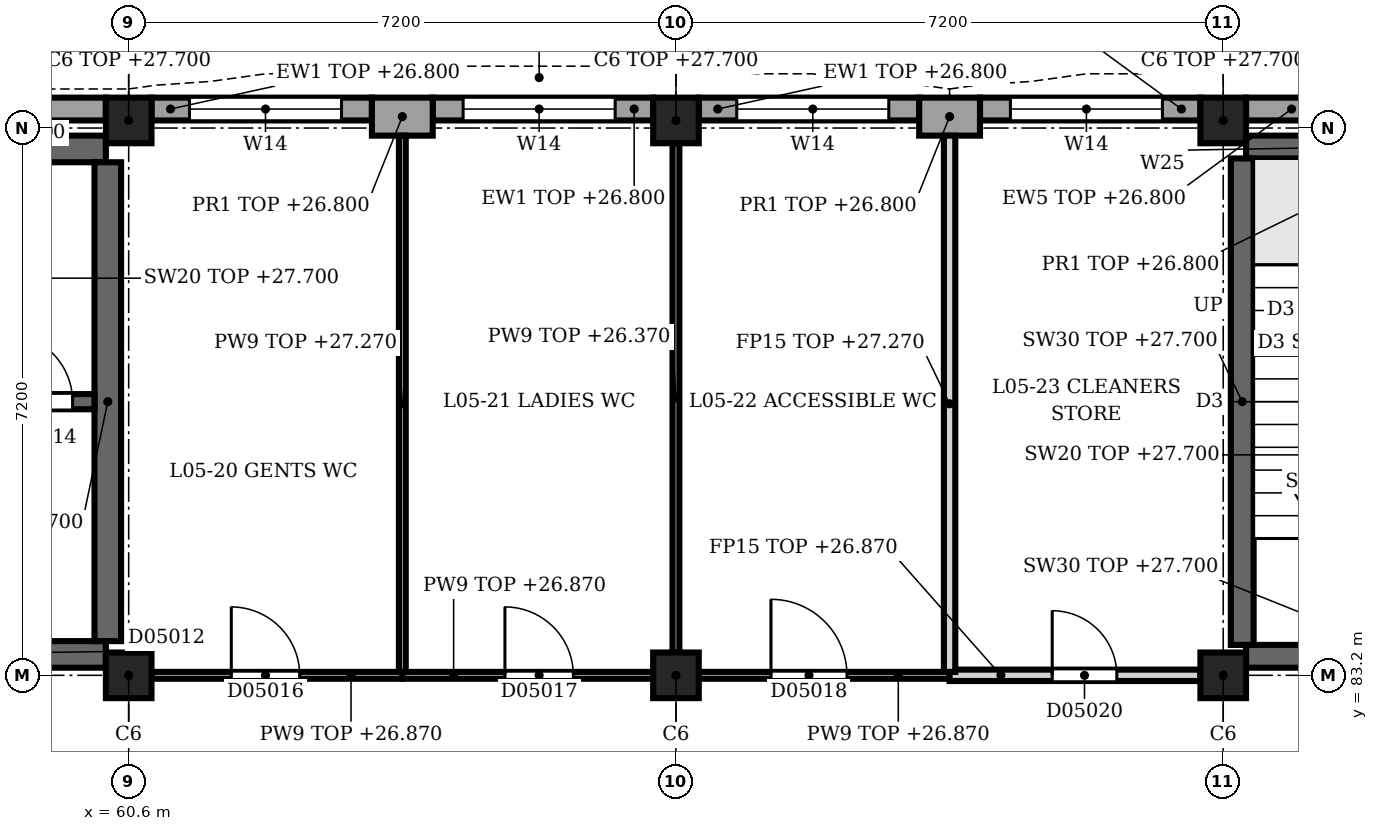
"""IFC4 building model, lengths in metres.
Left out: names, types, materials, properties, quantities, classifications, styles, units other than length and angle.
Written with IfcOpenShell. Run it as: python <this file> out.ifc"""

import sys

from ifc_helpers import new_model, si_unit, direction, frame, frame_2d, origin, origin_2d, place, context, subcontext, project, spatial, rectangle, extrude, element, fill, save


model = new_model("IFC4")
c1 = context("Model", 3, precision=1e-05, world=origin(), true_north=direction((0.0, 1.0)))
c2 = subcontext(c1, "Body", "Model", "MODEL_VIEW")
j1 = project(units=[si_unit("LENGTHUNIT", "METRE"), si_unit("PLANEANGLEUNIT", "RADIAN")], contexts=[c1])
p1 = place(None, origin())
s1 = spatial("IfcSite", under=j1, at=p1, CompositionType="ELEMENT")
p2 = place(p1, origin())
s2 = spatial("IfcBuilding", under=s1, at=p2, CompositionType="ELEMENT")
p3 = place(p2, frame((0.0, 0.0, 23.4)))
s3 = spatial("IfcBuildingStorey", under=s2, at=p3, CompositionType="ELEMENT", Elevation=23.4)
p4 = place(p3, frame((60.6, 83.2, 0.0), z_axis=(0.0, 0.0, 1.0), x_axis=(1.0, 0.0, 0.0)))
e1 = element("IfcColumn", 1, at=p4, inside=s3, PredefinedType="COLUMN", context=c2, shape_type="SweptSolid", body=[
    extrude(rectangle(XDim=0.6, YDim=0.6, at=origin_2d()), origin(), (0.0, 0.0, 1.0), 4.5),
])
p5 = place(p3, frame((60.6, 90.5, 0.0), z_axis=(0.0, 0.0, 1.0), x_axis=(1.0, 0.0, 0.0)))
e2 = element("IfcColumn", 2, at=p5, inside=s3, PredefinedType="COLUMN", context=c2, shape_type="SweptSolid", body=[
    extrude(rectangle(XDim=0.6, YDim=0.6, at=origin_2d()), origin(), (0.0, 0.0, 1.0), 4.3),
])
p6 = place(p3, frame((67.8, 83.2, 0.0), z_axis=(0.0, 0.0, 1.0), x_axis=(1.0, 0.0, 0.0)))
e3 = element("IfcColumn", 3, at=p6, inside=s3, PredefinedType="COLUMN", context=c2, shape_type="SweptSolid", body=[
    extrude(rectangle(XDim=0.6, YDim=0.6, at=origin_2d()), origin(), (0.0, 0.0, 1.0), 4.5),
])
p7 = place(p3, frame((67.8, 90.5, 0.0), z_axis=(0.0, 0.0, 1.0), x_axis=(1.0, 0.0, 0.0)))
e4 = element("IfcColumn", 4, at=p7, inside=s3, PredefinedType="COLUMN", context=c2, shape_type="SweptSolid", body=[
    extrude(rectangle(XDim=0.6, YDim=0.6, at=origin_2d()), origin(), (0.0, 0.0, 1.0), 4.3),
])
p8 = place(p3, frame((75.0, 83.2, 0.0), z_axis=(0.0, 0.0, 1.0), x_axis=(1.0, 0.0, 0.0)))
e5 = element("IfcColumn", 5, at=p8, inside=s3, PredefinedType="COLUMN", context=c2, shape_type="SweptSolid", body=[
    extrude(rectangle(XDim=0.6, YDim=0.6, at=origin_2d()), origin(), (0.0, 0.0, 1.0), 4.5),
])
p9 = place(p3, frame((75.0, 90.5, 0.0), z_axis=(0.0, 0.0, 1.0), x_axis=(1.0, 0.0, 0.0)))
e6 = element("IfcColumn", 6, at=p9, inside=s3, PredefinedType="COLUMN", context=c2, shape_type="SweptSolid", body=[
    extrude(rectangle(XDim=0.6, YDim=0.6, at=origin_2d()), origin(), (0.0, 0.0, 1.0), 4.3),
])
for number, where, z_axis, x_axis in (
    (7, (63.8, 90.55, 0.0), (0.0, 0.0, 1.0), (1.0, 0.0, 0.0)),
    (8, (71.0, 90.55, 0.0), (0.0, 0.0, 1.0), (1.0, 0.0, 0.0)),
):
    element("IfcWall", number, at=place(p3, frame(where, z_axis=z_axis, x_axis=x_axis)), inside=s3, PredefinedType="SOLIDWALL", context=c2, shape_type="SweptSolid", body=[
        extrude(rectangle(XDim=0.8, YDim=0.5, at=frame_2d((0.4, 0.0))), origin(), (0.0, 0.0, 1.0), 3.4),
    ])
p10 = place(p3, frame((57.4, 90.65, 0.0), z_axis=(0.0, 0.0, 1.0), x_axis=(1.0, 0.0, 0.0)))
e9 = element("IfcWall", 9, at=p10, inside=s3, PredefinedType="SOLIDWALL", context=c2, shape_type="SweptSolid", body=[
    extrude(rectangle(XDim=2.9, YDim=0.3, at=frame_2d((1.45, 0.0))), origin(), (0.0, 0.0, 1.0), 3.4),
])
p11 = place(p3, frame((60.9, 90.65, 0.0), z_axis=(0.0, 0.0, 1.0), x_axis=(1.0, 0.0, 0.0)))
e10 = element("IfcWall", 10, at=p11, inside=s3, PredefinedType="SOLIDWALL", context=c2, shape_type="SweptSolid", body=[
    extrude(rectangle(XDim=2.9, YDim=0.3, at=frame_2d((1.45, 0.0))), origin(), (0.0, 0.0, 1.0), 3.4),
])
p12 = place(p11, frame((0.5, 0.0, 0.9)))
e11 = element("IfcOpeningElement", 11, at=p12, cuts=e10, PredefinedType="OPENING", context=c2, shape_type="SweptSolid", body=[
    extrude(rectangle(XDim=2.0, YDim=2.4, at=frame_2d((1.0, 1.2))), frame((0.0, 0.16, 0.0), z_axis=(0.0, -1.0, 0.0), x_axis=(1.0, 0.0, 0.0)), (0.0, 0.0, 1.0), 0.32),
])
p13 = place(p3, frame((64.6, 90.65, 0.0), z_axis=(0.0, 0.0, 1.0), x_axis=(1.0, 0.0, 0.0)))
e12 = element("IfcWall", 12, at=p13, inside=s3, PredefinedType="SOLIDWALL", context=c2, shape_type="SweptSolid", body=[
    extrude(rectangle(XDim=2.9, YDim=0.3, at=frame_2d((1.45, 0.0))), origin(), (0.0, 0.0, 1.0), 3.4),
])
p14 = place(p13, frame((0.4, 0.0, 0.9)))
e13 = element("IfcOpeningElement", 13, at=p14, cuts=e12, PredefinedType="OPENING", context=c2, shape_type="SweptSolid", body=[
    extrude(rectangle(XDim=2.0, YDim=2.4, at=frame_2d((1.0, 1.2))), frame((0.0, 0.16, 0.0), z_axis=(0.0, -1.0, 0.0), x_axis=(1.0, 0.0, 0.0)), (0.0, 0.0, 1.0), 0.32),
])
p15 = place(p3, frame((68.1, 90.65, 0.0), z_axis=(0.0, 0.0, 1.0), x_axis=(1.0, 0.0, 0.0)))
e14 = element("IfcWall", 14, at=p15, inside=s3, PredefinedType="SOLIDWALL", context=c2, shape_type="SweptSolid", body=[
    extrude(rectangle(XDim=2.9, YDim=0.3, at=frame_2d((1.45, 0.0))), origin(), (0.0, 0.0, 1.0), 3.4),
])
p16 = place(p15, frame((0.5, 0.0, 0.9)))
e15 = element("IfcOpeningElement", 15, at=p16, cuts=e14, PredefinedType="OPENING", context=c2, shape_type="SweptSolid", body=[
    extrude(rectangle(XDim=2.0, YDim=2.4, at=frame_2d((1.0, 1.2))), frame((0.0, 0.16, 0.0), z_axis=(0.0, -1.0, 0.0), x_axis=(1.0, 0.0, 0.0)), (0.0, 0.0, 1.0), 0.32),
])
p17 = place(p3, frame((71.8, 90.65, 0.0), z_axis=(0.0, 0.0, 1.0), x_axis=(1.0, 0.0, 0.0)))
e16 = element("IfcWall", 16, at=p17, inside=s3, PredefinedType="SOLIDWALL", context=c2, shape_type="SweptSolid", body=[
    extrude(rectangle(XDim=2.9, YDim=0.3, at=frame_2d((1.45, 0.0))), origin(), (0.0, 0.0, 1.0), 3.4),
])
p18 = place(p17, frame((0.4, 0.0, 0.9)))
e17 = element("IfcOpeningElement", 17, at=p18, cuts=e16, PredefinedType="OPENING", context=c2, shape_type="SweptSolid", body=[
    extrude(rectangle(XDim=2.0, YDim=2.4, at=frame_2d((1.0, 1.2))), frame((0.0, 0.16, 0.0), z_axis=(0.0, -1.0, 0.0), x_axis=(1.0, 0.0, 0.0)), (0.0, 0.0, 1.0), 0.32),
])
p19 = place(p3, frame((75.3, 90.65, 0.0), z_axis=(0.0, 0.0, 1.0), x_axis=(1.0, 0.0, 0.0)))
e18 = element("IfcWall", 18, at=p19, inside=s3, PredefinedType="SOLIDWALL", context=c2, shape_type="SweptSolid", body=[
    extrude(rectangle(XDim=2.9, YDim=0.3, at=frame_2d((1.45, 0.0))), origin(), (0.0, 0.0, 1.0), 3.4),
])
p20 = place(p19, frame((1.2, 0.0, 1.2)))
e19 = element("IfcOpeningElement", 19, at=p20, cuts=e18, PredefinedType="OPENING", context=c2, shape_type="SweptSolid", body=[
    extrude(rectangle(XDim=0.6, YDim=1.8, at=frame_2d((0.3, 0.9))), frame((0.0, 0.16, 0.0), z_axis=(0.0, -1.0, 0.0), x_axis=(1.0, 0.0, 0.0)), (0.0, 0.0, 1.0), 0.32),
])
p21 = place(p3, frame((53.7, 83.475, 0.0), z_axis=(0.0, 0.0, 1.0), x_axis=(1.0, 0.0, 0.0)))
e20 = element("IfcWall", 20, at=p21, inside=s3, PredefinedType="SHEAR", context=c2, shape_type="SweptSolid", body=[
    extrude(rectangle(XDim=6.6, YDim=0.35, at=frame_2d((3.3, 0.0))), origin(), (0.0, 0.0, 1.0), 4.3),
])
p22 = place(p21, frame((2.7, 0.0, 0.0)))
e21 = element("IfcOpeningElement", 21, at=p22, cuts=e20, PredefinedType="OPENING", context=c2, shape_type="SweptSolid", body=[
    extrude(rectangle(XDim=1.8, YDim=2.1, at=frame_2d((0.9, 1.05))), frame((0.0, 0.185, 0.0), z_axis=(0.0, -1.0, 0.0), x_axis=(1.0, 0.0, 0.0)), (0.0, 0.0, 1.0), 0.37),
])
p23 = place(p3, frame((53.7, 90.125, 0.0), z_axis=(0.0, 0.0, 1.0), x_axis=(1.0, 0.0, 0.0)))
e22 = element("IfcWall", 22, at=p23, inside=s3, PredefinedType="SHEAR", context=c2, shape_type="SweptSolid", body=[
    extrude(rectangle(XDim=6.6, YDim=0.35, at=frame_2d((3.3, 0.0))), origin(), (0.0, 0.0, 1.0), 4.3),
])
p24 = place(p3, frame((60.325, 83.65, 0.0), z_axis=(0.0, 0.0, 1.0), x_axis=(0.0, 1.0, 0.0)))
e23 = element("IfcWall", 23, at=p24, inside=s3, PredefinedType="SHEAR", context=c2, shape_type="SweptSolid", body=[
    extrude(rectangle(XDim=6.3, YDim=0.35, at=frame_2d((3.15, 0.0))), origin(), (0.0, 0.0, 1.0), 4.3),
])
p25 = place(p3, frame((60.15, 86.8, 0.0), z_axis=(0.0, 0.0, 1.0), x_axis=(-1.0, 0.0, 0.0)))
e24 = element("IfcWall", 24, at=p25, inside=s3, PredefinedType="SHEAR", context=c2, shape_type="SweptSolid", body=[
    extrude(rectangle(XDim=10.35, YDim=0.2, at=frame_2d((5.175, 0.0))), origin(), (0.0, 0.0, 1.0), 4.3),
])
p26 = place(p25, frame((8.8, 0.0, 0.0)))
e25 = element("IfcOpeningElement", 25, at=p26, cuts=e24, PredefinedType="OPENING", context=c2, shape_type="SweptSolid", body=[
    extrude(rectangle(XDim=1.1, YDim=2.1, at=frame_2d((0.55, 1.05))), frame((0.0, 0.11, 0.0), z_axis=(0.0, -1.0, 0.0), x_axis=(1.0, 0.0, 0.0)), (0.0, 0.0, 1.0), 0.22),
])
p27 = place(p25, frame((6.6, 0.0, 0.0)))
e26 = element("IfcOpeningElement", 26, at=p27, cuts=e24, PredefinedType="OPENING", context=c2, shape_type="SweptSolid", body=[
    extrude(rectangle(XDim=1.1, YDim=2.1, at=frame_2d((0.55, 1.05))), frame((0.0, 0.11, 0.0), z_axis=(0.0, -1.0, 0.0), x_axis=(1.0, 0.0, 0.0)), (0.0, 0.0, 1.0), 0.22),
])
p28 = place(p25, frame((3.75, 0.0, 0.0)))
e27 = element("IfcOpeningElement", 27, at=p28, cuts=e24, PredefinedType="OPENING", context=c2, shape_type="SweptSolid", body=[
    extrude(rectangle(XDim=1.4, YDim=2.1, at=frame_2d((0.7, 1.05))), frame((0.0, 0.11, 0.0), z_axis=(0.0, -1.0, 0.0), x_axis=(1.0, 0.0, 0.0)), (0.0, 0.0, 1.0), 0.22),
])
p29 = place(p25, frame((1.962, 0.0, 0.0)))
e28 = element("IfcOpeningElement", 28, at=p29, cuts=e24, PredefinedType="OPENING", context=c2, shape_type="SweptSolid", body=[
    extrude(rectangle(XDim=0.9, YDim=2.1, at=frame_2d((0.45, 1.05))), frame((0.0, 0.11, 0.0), z_axis=(0.0, -1.0, 0.0), x_axis=(1.0, 0.0, 0.0)), (0.0, 0.0, 1.0), 0.22),
])
p30 = place(p25, frame((0.288, 0.0, 0.0)))
e29 = element("IfcOpeningElement", 29, at=p30, cuts=e24, PredefinedType="OPENING", context=c2, shape_type="SweptSolid", body=[
    extrude(rectangle(XDim=0.9, YDim=2.1, at=frame_2d((0.45, 1.05))), frame((0.0, 0.11, 0.0), z_axis=(0.0, -1.0, 0.0), x_axis=(1.0, 0.0, 0.0)), (0.0, 0.0, 1.0), 0.22),
])
p31 = place(p3, frame((75.3, 83.45, 0.0), z_axis=(0.0, 0.0, 1.0), x_axis=(1.0, 0.0, 0.0)))
e30 = element("IfcWall", 30, at=p31, inside=s3, PredefinedType="SHEAR", context=c2, shape_type="SweptSolid", body=[
    extrude(rectangle(XDim=6.7, YDim=0.3, at=frame_2d((3.35, 0.0))), origin(), (0.0, 0.0, 1.0), 4.3),
])
p32 = place(p31, frame((4.3, 0.0, 0.0)))
e31 = element("IfcOpeningElement", 31, at=p32, cuts=e30, PredefinedType="OPENING", context=c2, shape_type="SweptSolid", body=[
    extrude(rectangle(XDim=1.2, YDim=2.1, at=frame_2d((0.6, 1.05))), frame((0.0, 0.16, 0.0), z_axis=(0.0, -1.0, 0.0), x_axis=(1.0, 0.0, 0.0)), (0.0, 0.0, 1.0), 0.32),
])
p33 = place(p3, frame((75.3, 90.15, 0.0), z_axis=(0.0, 0.0, 1.0), x_axis=(1.0, 0.0, 0.0)))
e32 = element("IfcWall", 32, at=p33, inside=s3, PredefinedType="SHEAR", context=c2, shape_type="SweptSolid", body=[
    extrude(rectangle(XDim=6.7, YDim=0.3, at=frame_2d((3.35, 0.0))), origin(), (0.0, 0.0, 1.0), 4.3),
])
p34 = place(p33, frame((1.2, 0.0, 1.2)))
e33 = element("IfcOpeningElement", 33, at=p34, cuts=e32, PredefinedType="OPENING", context=c2, shape_type="SweptSolid", body=[
    extrude(rectangle(XDim=0.6, YDim=1.8, at=frame_2d((0.3, 0.9))), frame((0.0, 0.16, 0.0), z_axis=(0.0, -1.0, 0.0), x_axis=(1.0, 0.0, 0.0)), (0.0, 0.0, 1.0), 0.32),
])
p35 = place(p3, frame((75.25, 83.6, 0.0), z_axis=(0.0, 0.0, 1.0), x_axis=(0.0, 1.0, 0.0)))
e34 = element("IfcWall", 34, at=p35, inside=s3, PredefinedType="SHEAR", context=c2, shape_type="SweptSolid", body=[
    extrude(rectangle(XDim=6.4, YDim=0.3, at=frame_2d((3.2, 0.0))), origin(), (0.0, 0.0, 1.0), 4.3),
])
p36 = place(p3, frame((60.9, 83.2, 0.0), z_axis=(0.0, 0.0, 1.0), x_axis=(1.0, 0.0, 0.0)))
e35 = element("IfcWall", 35, at=p36, inside=s3, PredefinedType="PARTITIONING", context=c2, shape_type="SweptSolid", body=[
    extrude(rectangle(XDim=3.3, YDim=0.09, at=frame_2d((1.65, 0.0))), origin(), (0.0, 0.0, 1.0), 3.47),
])
p37 = place(p36, frame((1.05, 0.0, 0.0)))
e36 = element("IfcOpeningElement", 36, at=p37, cuts=e35, PredefinedType="OPENING", context=c2, shape_type="SweptSolid", body=[
    extrude(rectangle(XDim=0.9, YDim=2.1, at=frame_2d((0.45, 1.05))), frame((0.0, 0.055, 0.0), z_axis=(0.0, -1.0, 0.0), x_axis=(1.0, 0.0, 0.0)), (0.0, 0.0, 1.0), 0.11),
])
p38 = place(p3, frame((64.2, 83.2, 0.0), z_axis=(0.0, 0.0, 1.0), x_axis=(1.0, 0.0, 0.0)))
e37 = element("IfcWall", 37, at=p38, inside=s3, PredefinedType="PARTITIONING", context=c2, shape_type="SweptSolid", body=[
    extrude(rectangle(XDim=3.3, YDim=0.09, at=frame_2d((1.65, 0.0))), origin(), (0.0, 0.0, 1.0), 3.47),
])
p39 = place(p38, frame((1.35, 0.0, 0.0)))
e38 = element("IfcOpeningElement", 38, at=p39, cuts=e37, PredefinedType="OPENING", context=c2, shape_type="SweptSolid", body=[
    extrude(rectangle(XDim=0.9, YDim=2.1, at=frame_2d((0.45, 1.05))), frame((0.0, 0.055, 0.0), z_axis=(0.0, -1.0, 0.0), x_axis=(1.0, 0.0, 0.0)), (0.0, 0.0, 1.0), 0.11),
])
p40 = place(p3, frame((68.1, 83.2, 0.0), z_axis=(0.0, 0.0, 1.0), x_axis=(1.0, 0.0, 0.0)))
e39 = element("IfcWall", 39, at=p40, inside=s3, PredefinedType="PARTITIONING", context=c2, shape_type="SweptSolid", body=[
    extrude(rectangle(XDim=3.3, YDim=0.09, at=frame_2d((1.65, 0.0))), origin(), (0.0, 0.0, 1.0), 3.47),
])
p41 = place(p40, frame((0.95, 0.0, 0.0)))
e40 = element("IfcOpeningElement", 40, at=p41, cuts=e39, PredefinedType="OPENING", context=c2, shape_type="SweptSolid", body=[
    extrude(rectangle(XDim=1.0, YDim=2.2, at=frame_2d((0.5, 1.1))), frame((0.0, 0.055, 0.0), z_axis=(0.0, -1.0, 0.0), x_axis=(1.0, 0.0, 0.0)), (0.0, 0.0, 1.0), 0.11),
])
p42 = place(p3, frame((71.4, 83.2, 0.0), z_axis=(0.0, 0.0, 1.0), x_axis=(1.0, 0.0, 0.0)))
e41 = element("IfcWall", 41, at=p42, inside=s3, PredefinedType="PARTITIONING", context=c2, shape_type="SweptSolid", body=[
    extrude(rectangle(XDim=3.3, YDim=0.15, at=frame_2d((1.65, 0.0))), origin(), (0.0, 0.0, 1.0), 3.47),
])
p43 = place(p42, frame((1.35, 0.0, 0.0)))
e42 = element("IfcOpeningElement", 42, at=p43, cuts=e41, PredefinedType="OPENING", context=c2, shape_type="SweptSolid", body=[
    extrude(rectangle(XDim=0.85, YDim=2.1, at=frame_2d((0.425, 1.05))), frame((0.0, 0.085, 0.0), z_axis=(0.0, -1.0, 0.0), x_axis=(1.0, 0.0, 0.0)), (0.0, 0.0, 1.0), 0.17),
])
p44 = place(p3, frame((64.2, 83.245, 0.0), z_axis=(0.0, 0.0, 1.0), x_axis=(0.0, 1.0, 0.0)))
e43 = element("IfcWall", 43, at=p44, inside=s3, PredefinedType="PARTITIONING", context=c2, shape_type="SweptSolid", body=[
    extrude(rectangle(XDim=7.055, YDim=0.09, at=frame_2d((3.527, 0.0))), origin(), (0.0, 0.0, 1.0), 3.87),
])
p45 = place(p3, frame((67.8, 83.5, 0.0), z_axis=(0.0, 0.0, 1.0), x_axis=(0.0, 1.0, 0.0)))
e44 = element("IfcWall", 44, at=p45, inside=s3, PredefinedType="PARTITIONING", context=c2, shape_type="SweptSolid", body=[
    extrude(rectangle(XDim=6.7, YDim=0.09, at=frame_2d((3.35, 0.0))), origin(), (0.0, 0.0, 1.0), 2.97),
])
p46 = place(p3, frame((71.4, 83.245, 0.0), z_axis=(0.0, 0.0, 1.0), x_axis=(0.0, 1.0, 0.0)))
e45 = element("IfcWall", 45, at=p46, inside=s3, PredefinedType="PARTITIONING", context=c2, shape_type="SweptSolid", body=[
    extrude(rectangle(XDim=7.055, YDim=0.15, at=frame_2d((3.527, 0.0))), origin(), (0.0, 0.0, 1.0), 3.87),
])
p47 = place(p12, origin())
e46 = element("IfcWindow", 46, at=p47, inside=s3, PartitioningType="SINGLE_PANEL", PredefinedType="WINDOW", context=c2, shape_type="SweptSolid", body=[
    extrude(rectangle(XDim=2.0, YDim=2.4, at=frame_2d((1.0, 1.2))), frame((0.0, 0.03, 0.0), z_axis=(0.0, -1.0, 0.0), x_axis=(1.0, 0.0, 0.0)), (0.0, 0.0, 1.0), 0.06),
])
fill(e11, e46)
p48 = place(p14, origin())
e47 = element("IfcWindow", 47, at=p48, inside=s3, PartitioningType="SINGLE_PANEL", PredefinedType="WINDOW", context=c2, shape_type="SweptSolid", body=[
    extrude(rectangle(XDim=2.0, YDim=2.4, at=frame_2d((1.0, 1.2))), frame((0.0, 0.03, 0.0), z_axis=(0.0, -1.0, 0.0), x_axis=(1.0, 0.0, 0.0)), (0.0, 0.0, 1.0), 0.06),
])
fill(e13, e47)
p49 = place(p16, origin())
e48 = element("IfcWindow", 48, at=p49, inside=s3, PartitioningType="SINGLE_PANEL", PredefinedType="WINDOW", context=c2, shape_type="SweptSolid", body=[
    extrude(rectangle(XDim=2.0, YDim=2.4, at=frame_2d((1.0, 1.2))), frame((0.0, 0.03, 0.0), z_axis=(0.0, -1.0, 0.0), x_axis=(1.0, 0.0, 0.0)), (0.0, 0.0, 1.0), 0.06),
])
fill(e15, e48)
p50 = place(p18, origin())
e49 = element("IfcWindow", 49, at=p50, inside=s3, PartitioningType="SINGLE_PANEL", PredefinedType="WINDOW", context=c2, shape_type="SweptSolid", body=[
    extrude(rectangle(XDim=2.0, YDim=2.4, at=frame_2d((1.0, 1.2))), frame((0.0, 0.03, 0.0), z_axis=(0.0, -1.0, 0.0), x_axis=(1.0, 0.0, 0.0)), (0.0, 0.0, 1.0), 0.06),
])
fill(e17, e49)
p51 = place(p30, origin())
e50 = element("IfcDoor", 50, at=p51, inside=s3, OperationType="SINGLE_SWING_LEFT", PredefinedType="DOOR", context=c2, shape_type="SweptSolid", body=[
    extrude(rectangle(XDim=0.9, YDim=2.1, at=frame_2d((0.45, 1.05))), frame((0.0, 0.025, 0.0), z_axis=(0.0, -1.0, 0.0), x_axis=(1.0, 0.0, 0.0)), (0.0, 0.0, 1.0), 0.05),
])
fill(e29, e50)
p52 = place(p37, origin())
e51 = element("IfcDoor", 51, at=p52, inside=s3, OperationType="SINGLE_SWING_LEFT", PredefinedType="DOOR", context=c2, shape_type="SweptSolid", body=[
    extrude(rectangle(XDim=0.9, YDim=2.1, at=frame_2d((0.45, 1.05))), frame((0.0, 0.025, 0.0), z_axis=(0.0, -1.0, 0.0), x_axis=(1.0, 0.0, 0.0)), (0.0, 0.0, 1.0), 0.05),
])
fill(e36, e51)
p53 = place(p39, origin())
e52 = element("IfcDoor", 52, at=p53, inside=s3, OperationType="SINGLE_SWING_RIGHT", PredefinedType="DOOR", context=c2, shape_type="SweptSolid", body=[
    extrude(rectangle(XDim=0.9, YDim=2.1, at=frame_2d((0.45, 1.05))), frame((0.0, 0.025, 0.0), z_axis=(0.0, -1.0, 0.0), x_axis=(1.0, 0.0, 0.0)), (0.0, 0.0, 1.0), 0.05),
])
fill(e38, e52)
p54 = place(p41, origin())
e53 = element("IfcDoor", 53, at=p54, inside=s3, OperationType="SINGLE_SWING_LEFT", PredefinedType="DOOR", context=c2, shape_type="SweptSolid", body=[
    extrude(rectangle(XDim=1.0, YDim=2.2, at=frame_2d((0.5, 1.1))), frame((0.0, 0.025, 0.0), z_axis=(0.0, -1.0, 0.0), x_axis=(1.0, 0.0, 0.0)), (0.0, 0.0, 1.0), 0.05),
])
fill(e40, e53)
p55 = place(p43, origin())
e54 = element("IfcDoor", 54, at=p55, inside=s3, OperationType="SINGLE_SWING_RIGHT", PredefinedType="DOOR", context=c2, shape_type="SweptSolid", body=[
    extrude(rectangle(XDim=0.85, YDim=2.1, at=frame_2d((0.425, 1.05))), frame((0.0, 0.025, 0.0), z_axis=(0.0, -1.0, 0.0), x_axis=(1.0, 0.0, 0.0)), (0.0, 0.0, 1.0), 0.05),
])
fill(e42, e54)
save(model, sys.argv[1])
